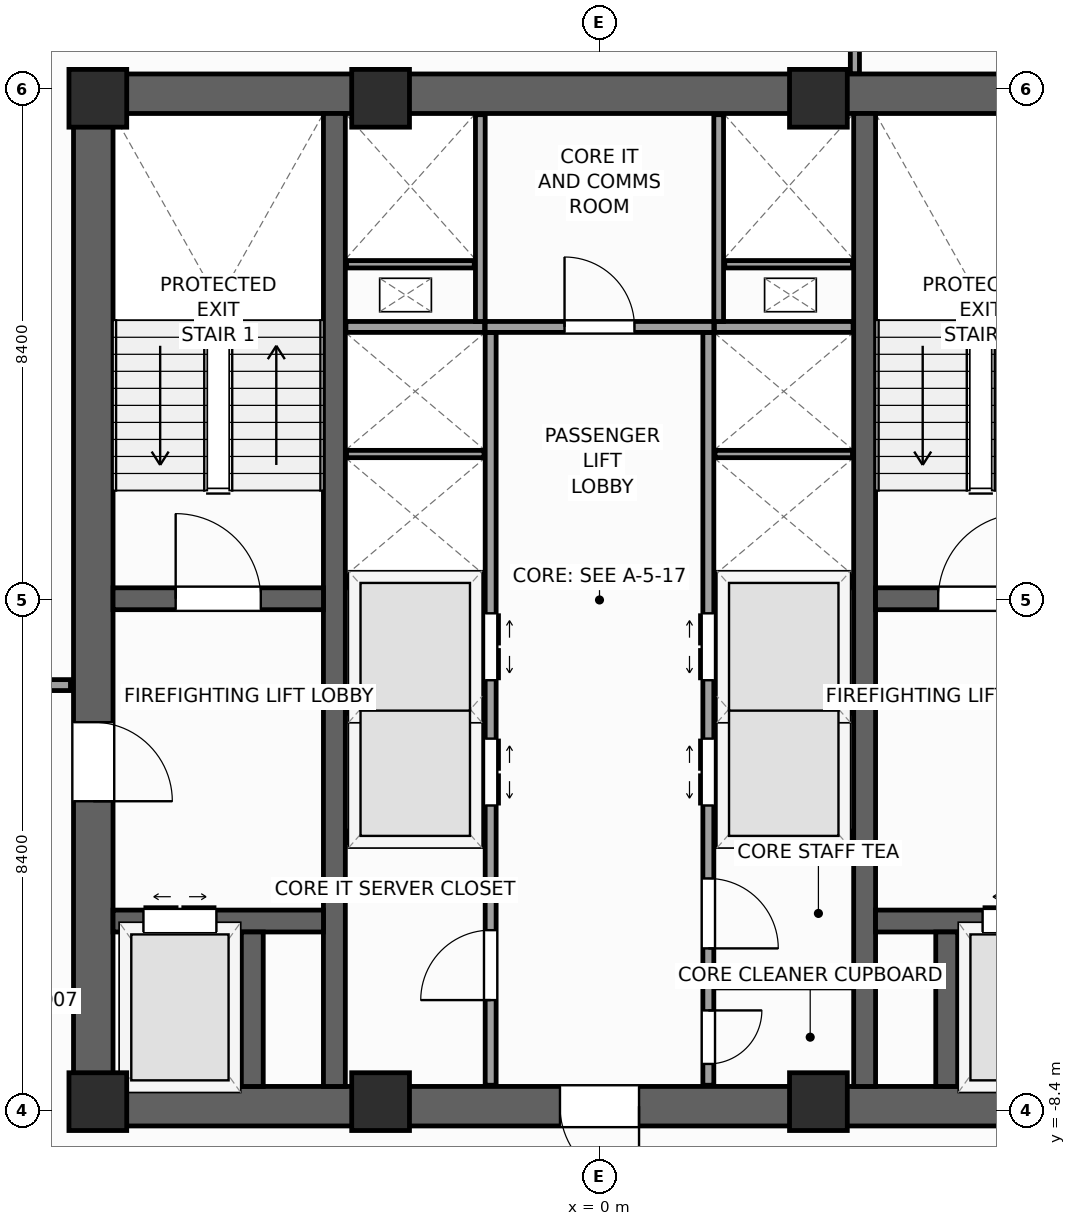
"""IFC4 building model, lengths in metres.
Left out: names, types, materials, properties, quantities, classifications, styles, units other than length and angle.
Written with IfcOpenShell. Run it as: python <this file> out.ifc"""

import sys

from ifc_helpers import new_model, si_unit, direction, frame, frame_2d, origin, origin_2d, place, context, subcontext, project, spatial, rectangle, extrude, source, transform, mapped, element, fill, save


model = new_model("IFC4")
c1 = context("Model", 3, precision=1e-05, world=origin(), true_north=direction((0.0, 1.0)))
c2 = subcontext(c1, "Body", "Model", "MODEL_VIEW")
j1 = project(units=[si_unit("LENGTHUNIT", "METRE"), si_unit("PLANEANGLEUNIT", "RADIAN")], contexts=[c1])
p1 = place(None, origin())
s1 = spatial("IfcSite", under=j1, at=p1, CompositionType="ELEMENT")
p2 = place(p1, origin())
s2 = spatial("IfcBuilding", under=s1, at=p2, CompositionType="ELEMENT")
p3 = place(p2, frame((0.0, 0.0, 176.4)))
s3 = spatial("IfcBuildingStorey", under=s2, at=p3, CompositionType="ELEMENT", Elevation=176.4)
p4 = place(p3, frame((-8.65, -8.325, 0.0), z_axis=(0.0, 0.0, 1.0), x_axis=(1.0, 0.0, 0.0)))
e1 = element("IfcWall", 1, at=p4, inside=s3, PredefinedType="SHEAR", context=c2, shape_type="SweptSolid", body=[
    extrude(rectangle(XDim=17.3, YDim=0.65, at=frame_2d((8.65, 0.0))), origin(), (0.0, 0.0, 1.0), 4.0),
])
p5 = place(p4, frame((8.0, 0.0, 0.0)))
e2 = element("IfcOpeningElement", 2, at=p5, cuts=e1, PredefinedType="OPENING", context=c2, shape_type="SweptSolid", body=[
    extrude(rectangle(XDim=1.3, YDim=2.2, at=frame_2d((0.65, 1.1))), frame((0.0, 0.335, 0.0), z_axis=(0.0, -1.0, 0.0), x_axis=(1.0, 0.0, 0.0)), (0.0, 0.0, 1.0), 0.67),
])
p6 = place(p3, frame((-8.65, 8.325, 0.0), z_axis=(0.0, 0.0, 1.0), x_axis=(1.0, 0.0, 0.0)))
e3 = element("IfcWall", 3, at=p6, inside=s3, PredefinedType="SHEAR", context=c2, shape_type="SweptSolid", body=[
    extrude(rectangle(XDim=17.3, YDim=0.65, at=frame_2d((8.65, 0.0))), origin(), (0.0, 0.0, 1.0), 4.0),
])
p7 = place(p3, frame((-8.325, -8.0, 0.0), z_axis=(0.0, 0.0, 1.0), x_axis=(0.0, 1.0, 0.0)))
e4 = element("IfcWall", 4, at=p7, inside=s3, PredefinedType="SHEAR", context=c2, shape_type="SweptSolid", body=[
    extrude(rectangle(XDim=16.0, YDim=0.65, at=frame_2d((8.0, 0.0))), origin(), (0.0, 0.0, 1.0), 4.0),
])
p8 = place(p7, frame((4.69, 0.0, 0.0)))
e5 = element("IfcOpeningElement", 5, at=p8, cuts=e4, PredefinedType="OPENING", context=c2, shape_type="SweptSolid", body=[
    extrude(rectangle(XDim=1.3, YDim=2.2, at=frame_2d((0.65, 1.1))), frame((0.0, 0.335, 0.0), z_axis=(0.0, -1.0, 0.0), x_axis=(1.0, 0.0, 0.0)), (0.0, 0.0, 1.0), 0.67),
])
for number, where, z_axis, x_axis in (
    (6, (-4.36, -8.0, 0.0), (0.0, 0.0, 1.0), (0.0, 1.0, 0.0)),
    (7, (4.36, -8.0, 0.0), (0.0, 0.0, 1.0), (0.0, 1.0, 0.0)),
):
    element("IfcWall", number, at=place(p3, frame(where, z_axis=z_axis, x_axis=x_axis)), inside=s3, PredefinedType="SHEAR", context=c2, shape_type="SweptSolid", body=[
        extrude(rectangle(XDim=16.0, YDim=0.36, at=frame_2d((8.0, 0.0))), origin(), (0.0, 0.0, 1.0), 4.0),
    ])
p9 = place(p3, frame((-8.0, 0.02, 0.0), z_axis=(0.0, 0.0, 1.0), x_axis=(1.0, 0.0, 0.0)))
e8 = element("IfcWall", 8, at=p9, inside=s3, PredefinedType="SHEAR", context=c2, shape_type="SweptSolid", body=[
    extrude(rectangle(XDim=3.46, YDim=0.36, at=frame_2d((1.73, 0.0))), origin(), (0.0, 0.0, 1.0), 4.0),
])
p10 = place(p9, frame((1.03, 0.0, 0.0)))
e9 = element("IfcOpeningElement", 9, at=p10, cuts=e8, PredefinedType="OPENING", context=c2, shape_type="SweptSolid", body=[
    extrude(rectangle(XDim=1.4, YDim=2.2, at=frame_2d((0.7, 1.1))), frame((0.0, 0.19, 0.0), z_axis=(0.0, -1.0, 0.0), x_axis=(1.0, 0.0, 0.0)), (0.0, 0.0, 1.0), 0.38),
])
p11 = place(p3, frame((4.54, 0.02, 0.0), z_axis=(0.0, 0.0, 1.0), x_axis=(1.0, 0.0, 0.0)))
e10 = element("IfcWall", 10, at=p11, inside=s3, PredefinedType="SHEAR", context=c2, shape_type="SweptSolid", body=[
    extrude(rectangle(XDim=3.46, YDim=0.36, at=frame_2d((1.73, 0.0))), origin(), (0.0, 0.0, 1.0), 4.0),
])
p12 = place(p11, frame((1.03, 0.0, 0.0)))
e11 = element("IfcOpeningElement", 11, at=p12, cuts=e10, PredefinedType="OPENING", context=c2, shape_type="SweptSolid", body=[
    extrude(rectangle(XDim=1.4, YDim=2.2, at=frame_2d((0.7, 1.1))), frame((0.0, 0.19, 0.0), z_axis=(0.0, -1.0, 0.0), x_axis=(1.0, 0.0, 0.0)), (0.0, 0.0, 1.0), 0.38),
])
p13 = place(p3, frame((-8.0, -5.28, 0.0), z_axis=(0.0, 0.0, 1.0), x_axis=(1.0, 0.0, 0.0)))
e12 = element("IfcWall", 12, at=p13, inside=s3, PredefinedType="SHEAR", context=c2, shape_type="SweptSolid", body=[
    extrude(rectangle(XDim=3.46, YDim=0.36, at=frame_2d((1.73, 0.0))), origin(), (0.0, 0.0, 1.0), 4.0),
])
p14 = place(p13, frame((0.5, 0.0, 0.0)))
e13 = element("IfcOpeningElement", 13, at=p14, cuts=e12, PredefinedType="OPENING", context=c2, shape_type="SweptSolid", body=[
    extrude(rectangle(XDim=1.2, YDim=2.25, at=frame_2d((0.6, 1.125))), frame((0.0, 0.19, 0.0), z_axis=(0.0, -1.0, 0.0), x_axis=(1.0, 0.0, 0.0)), (0.0, 0.0, 1.0), 0.38),
])
p15 = place(p3, frame((4.54, -5.28, 0.0), z_axis=(0.0, 0.0, 1.0), x_axis=(1.0, 0.0, 0.0)))
e14 = element("IfcWall", 14, at=p15, inside=s3, PredefinedType="SHEAR", context=c2, shape_type="SweptSolid", body=[
    extrude(rectangle(XDim=3.46, YDim=0.36, at=frame_2d((1.73, 0.0))), origin(), (0.0, 0.0, 1.0), 4.0),
])
p16 = place(p15, frame((1.76, 0.0, 0.0)))
e15 = element("IfcOpeningElement", 15, at=p16, cuts=e14, PredefinedType="OPENING", context=c2, shape_type="SweptSolid", body=[
    extrude(rectangle(XDim=1.2, YDim=2.25, at=frame_2d((0.6, 1.125))), frame((0.0, 0.19, 0.0), z_axis=(0.0, -1.0, 0.0), x_axis=(1.0, 0.0, 0.0)), (0.0, 0.0, 1.0), 0.38),
])
for number, where, z_axis, x_axis in (
    (16, (-5.71, -8.0, 0.0), (0.0, 0.0, 1.0), (0.0, 1.0, 0.0)),
    (17, (5.71, -8.0, 0.0), (0.0, 0.0, 1.0), (0.0, 1.0, 0.0)),
):
    element("IfcWall", number, at=place(p3, frame(where, z_axis=z_axis, x_axis=x_axis)), inside=s3, PredefinedType="SHEAR", context=c2, shape_type="SweptSolid", body=[
        extrude(rectangle(XDim=2.54, YDim=0.36, at=frame_2d((1.27, 0.0))), origin(), (0.0, 0.0, 1.0), 4.0),
    ])
m1 = source(origin(), c2, "Body", "SweptSolid", [
    extrude(rectangle(XDim=0.95, YDim=0.95, at=origin_2d()), origin(), (0.0, 0.0, 1.0), 4.0),
])
for number, where, z_axis, x_axis in (
    (18, (-8.25, -8.25, 0.0), (0.0, 0.0, 1.0), (1.0, 0.0, 0.0)),
    (19, (-8.25, 8.25, 0.0), (0.0, 0.0, 1.0), (1.0, 0.0, 0.0)),
    (20, (-3.6, -8.25, 0.0), (0.0, 0.0, 1.0), (1.0, 0.0, 0.0)),
    (21, (3.6, -8.25, 0.0), (0.0, 0.0, 1.0), (1.0, 0.0, 0.0)),
    (22, (-3.6, 8.25, 0.0), (0.0, 0.0, 1.0), (1.0, 0.0, 0.0)),
    (23, (3.6, 8.25, 0.0), (0.0, 0.0, 1.0), (1.0, 0.0, 0.0)),
):
    element("IfcColumn", number, at=place(p3, frame(where, z_axis=z_axis, x_axis=x_axis)), inside=s3, PredefinedType="PILASTER", context=c2, shape_type="MappedRepresentation", body=[
        mapped(m1, transform((0.0, 0.0, 0.0), scale=1.0)),
    ])
p17 = place(p3, frame((-1.79, -7.98, 0.0), z_axis=(0.0, 0.0, 1.0), x_axis=(0.0, 1.0, 0.0)))
e24 = element("IfcWall", 24, at=p17, inside=s3, PredefinedType="PARTITIONING", context=c2, shape_type="SweptSolid", body=[
    extrude(rectangle(XDim=12.38, YDim=0.18, at=frame_2d((6.19, 0.0))), origin(), (0.0, 0.0, 1.0), 3.74),
])
p18 = place(p17, frame((4.6, 0.0, 0.0)))
e25 = element("IfcOpeningElement", 25, at=p18, cuts=e24, PredefinedType="OPENING", context=c2, shape_type="SweptSolid", body=[
    extrude(rectangle(XDim=1.1, YDim=2.2, at=frame_2d((0.55, 1.1))), frame((0.0, 0.1, 0.0), z_axis=(0.0, -1.0, 0.0), x_axis=(1.0, 0.0, 0.0)), (0.0, 0.0, 1.0), 0.2),
])
p19 = place(p17, frame((6.66, 0.0, 0.0)))
e26 = element("IfcOpeningElement", 26, at=p19, cuts=e24, PredefinedType="OPENING", context=c2, shape_type="SweptSolid", body=[
    extrude(rectangle(XDim=1.1, YDim=2.2, at=frame_2d((0.55, 1.1))), frame((0.0, 0.1, 0.0), z_axis=(0.0, -1.0, 0.0), x_axis=(1.0, 0.0, 0.0)), (0.0, 0.0, 1.0), 0.2),
])
p20 = place(p17, frame((1.4, 0.0, 0.0)))
e27 = element("IfcOpeningElement", 27, at=p20, cuts=e24, PredefinedType="OPENING", context=c2, shape_type="SweptSolid", body=[
    extrude(rectangle(XDim=1.15, YDim=2.25, at=frame_2d((0.575, 1.125))), frame((0.0, 0.1, 0.0), z_axis=(0.0, -1.0, 0.0), x_axis=(1.0, 0.0, 0.0)), (0.0, 0.0, 1.0), 0.2),
])
p21 = place(p3, frame((1.79, -7.98, 0.0), z_axis=(0.0, 0.0, 1.0), x_axis=(0.0, 1.0, 0.0)))
e28 = element("IfcWall", 28, at=p21, inside=s3, PredefinedType="PARTITIONING", context=c2, shape_type="SweptSolid", body=[
    extrude(rectangle(XDim=12.38, YDim=0.18, at=frame_2d((6.19, 0.0))), origin(), (0.0, 0.0, 1.0), 3.74),
])
p22 = place(p21, frame((4.6, 0.0, 0.0)))
e29 = element("IfcOpeningElement", 29, at=p22, cuts=e28, PredefinedType="OPENING", context=c2, shape_type="SweptSolid", body=[
    extrude(rectangle(XDim=1.1, YDim=2.2, at=frame_2d((0.55, 1.1))), frame((0.0, 0.1, 0.0), z_axis=(0.0, -1.0, 0.0), x_axis=(1.0, 0.0, 0.0)), (0.0, 0.0, 1.0), 0.2),
])
p23 = place(p21, frame((6.66, 0.0, 0.0)))
e30 = element("IfcOpeningElement", 30, at=p23, cuts=e28, PredefinedType="OPENING", context=c2, shape_type="SweptSolid", body=[
    extrude(rectangle(XDim=1.1, YDim=2.2, at=frame_2d((0.55, 1.1))), frame((0.0, 0.1, 0.0), z_axis=(0.0, -1.0, 0.0), x_axis=(1.0, 0.0, 0.0)), (0.0, 0.0, 1.0), 0.2),
])
p24 = place(p21, frame((0.35, 0.0, 0.0)))
e31 = element("IfcOpeningElement", 31, at=p24, cuts=e28, PredefinedType="OPENING", context=c2, shape_type="SweptSolid", body=[
    extrude(rectangle(XDim=0.88, YDim=2.1, at=frame_2d((0.44, 1.05))), frame((0.0, 0.1, 0.0), z_axis=(0.0, -1.0, 0.0), x_axis=(1.0, 0.0, 0.0)), (0.0, 0.0, 1.0), 0.2),
])
p25 = place(p21, frame((2.25, 0.0, 0.0)))
e32 = element("IfcOpeningElement", 32, at=p25, cuts=e28, PredefinedType="OPENING", context=c2, shape_type="SweptSolid", body=[
    extrude(rectangle(XDim=1.15, YDim=2.25, at=frame_2d((0.575, 1.125))), frame((0.0, 0.1, 0.0), z_axis=(0.0, -1.0, 0.0), x_axis=(1.0, 0.0, 0.0)), (0.0, 0.0, 1.0), 0.2),
])
p26 = place(p3, frame((-1.88, 4.49, 0.0), z_axis=(0.0, 0.0, 1.0), x_axis=(1.0, 0.0, 0.0)))
e33 = element("IfcWall", 33, at=p26, inside=s3, PredefinedType="PARTITIONING", context=c2, shape_type="SweptSolid", body=[
    extrude(rectangle(XDim=3.76, YDim=0.18, at=frame_2d((1.88, 0.0))), origin(), (0.0, 0.0, 1.0), 3.74),
])
p27 = place(p26, frame((1.305, 0.0, 0.0)))
e34 = element("IfcOpeningElement", 34, at=p27, cuts=e33, PredefinedType="OPENING", context=c2, shape_type="SweptSolid", body=[
    extrude(rectangle(XDim=1.15, YDim=2.25, at=frame_2d((0.575, 1.125))), frame((0.0, 0.1, 0.0), z_axis=(0.0, -1.0, 0.0), x_axis=(1.0, 0.0, 0.0)), (0.0, 0.0, 1.0), 0.2),
])
for number, where, z_axis, x_axis in (
    (35, (-4.17, -3.9, 0.0), (0.0, 0.0, 1.0), (1.0, 0.0, 0.0)),
    (36, (1.89, -3.9, 0.0), (0.0, 0.0, 1.0), (1.0, 0.0, 0.0)),
    (37, (-4.17, 0.3, 0.0), (0.0, 0.0, 1.0), (1.0, 0.0, 0.0)),
    (38, (1.89, 0.3, 0.0), (0.0, 0.0, 1.0), (1.0, 0.0, 0.0)),
    (39, (-4.17, 4.49, 0.0), (0.0, 0.0, 1.0), (1.0, 0.0, 0.0)),
    (40, (1.89, 4.49, 0.0), (0.0, 0.0, 1.0), (1.0, 0.0, 0.0)),
):
    element("IfcWall", number, at=place(p3, frame(where, z_axis=z_axis, x_axis=x_axis)), inside=s3, PredefinedType="PARTITIONING", context=c2, shape_type="SweptSolid", body=[
        extrude(rectangle(XDim=2.28, YDim=0.18, at=frame_2d((1.14, 0.0))), origin(), (0.0, 0.0, 1.0), 3.74),
    ])
for number, where, z_axis, x_axis in (
    (41, (-4.16, -1.8, 0.0), (0.0, 0.0, 1.0), (1.0, 0.0, 0.0)),
    (42, (1.9, -1.8, 0.0), (0.0, 0.0, 1.0), (1.0, 0.0, 0.0)),
    (43, (-4.16, 2.4, 0.0), (0.0, 0.0, 1.0), (1.0, 0.0, 0.0)),
    (44, (1.9, 2.4, 0.0), (0.0, 0.0, 1.0), (1.0, 0.0, 0.0)),
):
    element("IfcWall", number, at=place(p3, frame(where, z_axis=z_axis, x_axis=x_axis)), inside=s3, PredefinedType="PARTITIONING", context=c2, shape_type="SweptSolid", body=[
        extrude(rectangle(XDim=2.26, YDim=0.12, at=frame_2d((1.13, 0.0))), origin(), (0.0, 0.0, 1.0), 3.74),
    ])
p28 = place(p3, frame((1.89, -6.3, 0.0), z_axis=(0.0, 0.0, 1.0), x_axis=(1.0, 0.0, 0.0)))
e45 = element("IfcWall", 45, at=p28, inside=s3, PredefinedType="PARTITIONING", context=c2, shape_type="SweptSolid", body=[
    extrude(rectangle(XDim=2.28, YDim=0.16, at=frame_2d((1.14, 0.0))), origin(), (0.0, 0.0, 1.0), 3.74),
])
for number, where, z_axis, x_axis in (
    (46, (-1.96, 4.58, 0.0), (0.0, 0.0, 1.0), (0.0, 1.0, 0.0)),
    (47, (1.96, 4.58, 0.0), (0.0, 0.0, 1.0), (0.0, 1.0, 0.0)),
):
    element("IfcWall", number, at=place(p3, frame(where, z_axis=z_axis, x_axis=x_axis)), inside=s3, PredefinedType="PARTITIONING", context=c2, shape_type="SweptSolid", body=[
        extrude(rectangle(XDim=3.4, YDim=0.16, at=frame_2d((1.7, 0.0))), origin(), (0.0, 0.0, 1.0), 3.74),
    ])
for number, where, z_axis, x_axis in (
    (48, (-4.16, 5.52, 0.0), (0.0, 0.0, 1.0), (1.0, 0.0, 0.0)),
    (49, (2.06, 5.52, 0.0), (0.0, 0.0, 1.0), (1.0, 0.0, 0.0)),
):
    element("IfcWall", number, at=place(p3, frame(where, z_axis=z_axis, x_axis=x_axis)), inside=s3, PredefinedType="PARTITIONING", context=c2, shape_type="SweptSolid", body=[
        extrude(rectangle(XDim=2.1, YDim=0.12, at=frame_2d((1.05, 0.0))), origin(), (0.0, 0.0, 1.0), 3.74),
    ])
p29 = place(p3, frame((-10.45, -1.4, 0.0), z_axis=(0.0, 0.0, 1.0), x_axis=(1.0, 0.0, 0.0)))
e50 = element("IfcWall", 50, at=p29, inside=s3, PredefinedType="PARTITIONING", context=c2, shape_type="SweptSolid", body=[
    extrude(rectangle(XDim=1.75, YDim=0.18, at=frame_2d((0.875, 0.0))), origin(), (0.0, 0.0, 1.0), 3.74),
])
p30 = place(p29, frame((0.325, 0.0, 0.0)))
e51 = element("IfcOpeningElement", 51, at=p30, cuts=e50, PredefinedType="OPENING", context=c2, shape_type="SweptSolid", body=[
    extrude(rectangle(XDim=1.1, YDim=2.2, at=frame_2d((0.55, 1.1))), frame((0.0, 0.1, 0.0), z_axis=(0.0, -1.0, 0.0), x_axis=(1.0, 0.0, 0.0)), (0.0, 0.0, 1.0), 0.2),
])
p31 = place(p3, frame((4.2, 8.655, 0.0), z_axis=(0.0, 0.0, 1.0), x_axis=(0.0, 1.0, 0.0)))
e52 = element("IfcWall", 52, at=p31, inside=s3, PredefinedType="PARTITIONING", context=c2, shape_type="SweptSolid", body=[
    extrude(rectangle(XDim=21.286, YDim=0.15, at=frame_2d((10.643, 0.0))), origin(), (0.0, 0.0, 1.0), 3.74),
])
m2 = source(origin(), c2, "Body", "SweptSolid", [
    extrude(rectangle(XDim=1.4, YDim=2.2, at=frame_2d((0.7, 1.1))), frame((0.0, 0.025, 0.0), z_axis=(0.0, -1.0, 0.0), x_axis=(1.0, 0.0, 0.0)), (0.0, 0.0, 1.0), 0.05),
])
p32 = place(p10, origin())
e53 = element("IfcDoor", 53, at=p32, inside=s3, OperationType="SINGLE_SWING_LEFT", PredefinedType="DOOR", context=c2, shape_type="MappedRepresentation", body=[
    mapped(m2, transform((0.0, 0.0, 0.0), scale=1.0)),
])
fill(e9, e53)
p33 = place(p12, origin())
e54 = element("IfcDoor", 54, at=p33, inside=s3, OperationType="SINGLE_SWING_RIGHT", PredefinedType="DOOR", context=c2, shape_type="MappedRepresentation", body=[
    mapped(m2, transform((0.0, 0.0, 0.0), scale=1.0)),
])
fill(e11, e54)
m3 = source(origin(), c2, "Body", "SweptSolid", [
    extrude(rectangle(XDim=1.3, YDim=2.2, at=frame_2d((0.65, 1.1))), frame((0.0, 0.025, 0.0), z_axis=(0.0, -1.0, 0.0), x_axis=(1.0, 0.0, 0.0)), (0.0, 0.0, 1.0), 0.05),
])
p34 = place(p8, frame((1.3, 0.0, 0.0), z_axis=(0.0, 0.0, 1.0), x_axis=(-1.0, 0.0, 0.0)))
e55 = element("IfcDoor", 55, at=p34, inside=s3, OperationType="SINGLE_SWING_LEFT", PredefinedType="DOOR", context=c2, shape_type="MappedRepresentation", body=[
    mapped(m3, transform((0.0, 0.0, 0.0), scale=1.0)),
])
fill(e5, e55)
p35 = place(p5, frame((1.3, 0.0, 0.0), z_axis=(0.0, 0.0, 1.0), x_axis=(-1.0, 0.0, 0.0)))
e56 = element("IfcDoor", 56, at=p35, inside=s3, OperationType="SINGLE_SWING_RIGHT", PredefinedType="DOOR", context=c2, shape_type="MappedRepresentation", body=[
    mapped(m3, transform((0.0, 0.0, 0.0), scale=1.0)),
])
fill(e2, e56)
m4 = source(origin(), c2, "Body", "SweptSolid", [
    extrude(rectangle(XDim=1.2, YDim=2.25, at=frame_2d((0.6, 1.125))), frame((0.0, 0.025, 0.0), z_axis=(0.0, -1.0, 0.0), x_axis=(1.0, 0.0, 0.0)), (0.0, 0.0, 1.0), 0.05),
])
p36 = place(p14, origin())
e57 = element("IfcDoor", 57, at=p36, inside=s3, OperationType="DOUBLE_DOOR_SLIDING", PredefinedType="DOOR", context=c2, shape_type="MappedRepresentation", body=[
    mapped(m4, transform((0.0, 0.0, 0.0), scale=1.0)),
])
fill(e13, e57)
p37 = place(p16, origin())
e58 = element("IfcDoor", 58, at=p37, inside=s3, OperationType="DOUBLE_DOOR_SLIDING", PredefinedType="DOOR", context=c2, shape_type="MappedRepresentation", body=[
    mapped(m4, transform((0.0, 0.0, 0.0), scale=1.0)),
])
fill(e15, e58)
m5 = source(origin(), c2, "Body", "SweptSolid", [
    extrude(rectangle(XDim=1.1, YDim=2.2, at=frame_2d((0.55, 1.1))), frame((0.0, 0.025, 0.0), z_axis=(0.0, -1.0, 0.0), x_axis=(1.0, 0.0, 0.0)), (0.0, 0.0, 1.0), 0.05),
])
p38 = place(p18, frame((1.1, 0.0, 0.0), z_axis=(0.0, 0.0, 1.0), x_axis=(-1.0, 0.0, 0.0)))
e59 = element("IfcDoor", 59, at=p38, inside=s3, OperationType="DOUBLE_DOOR_SLIDING", PredefinedType="DOOR", context=c2, shape_type="MappedRepresentation", body=[
    mapped(m5, transform((0.0, 0.0, 0.0), scale=1.0)),
])
fill(e25, e59)
p39 = place(p19, frame((1.1, 0.0, 0.0), z_axis=(0.0, 0.0, 1.0), x_axis=(-1.0, 0.0, 0.0)))
e60 = element("IfcDoor", 60, at=p39, inside=s3, OperationType="DOUBLE_DOOR_SLIDING", PredefinedType="DOOR", context=c2, shape_type="MappedRepresentation", body=[
    mapped(m5, transform((0.0, 0.0, 0.0), scale=1.0)),
])
fill(e26, e60)
p40 = place(p22, origin())
e61 = element("IfcDoor", 61, at=p40, inside=s3, OperationType="DOUBLE_DOOR_SLIDING", PredefinedType="DOOR", context=c2, shape_type="MappedRepresentation", body=[
    mapped(m5, transform((0.0, 0.0, 0.0), scale=1.0)),
])
fill(e29, e61)
p41 = place(p23, origin())
e62 = element("IfcDoor", 62, at=p41, inside=s3, OperationType="DOUBLE_DOOR_SLIDING", PredefinedType="DOOR", context=c2, shape_type="MappedRepresentation", body=[
    mapped(m5, transform((0.0, 0.0, 0.0), scale=1.0)),
])
fill(e30, e62)
m6 = source(origin(), c2, "Body", "SweptSolid", [
    extrude(rectangle(XDim=1.15, YDim=2.25, at=frame_2d((0.575, 1.125))), frame((0.0, 0.025, 0.0), z_axis=(0.0, -1.0, 0.0), x_axis=(1.0, 0.0, 0.0)), (0.0, 0.0, 1.0), 0.05),
])
p42 = place(p20, origin())
e63 = element("IfcDoor", 63, at=p42, inside=s3, OperationType="SINGLE_SWING_LEFT", PredefinedType="DOOR", context=c2, shape_type="MappedRepresentation", body=[
    mapped(m6, transform((0.0, 0.0, 0.0), scale=1.0)),
])
fill(e27, e63)
m7 = source(origin(), c2, "Body", "SweptSolid", [
    extrude(rectangle(XDim=0.88, YDim=2.1, at=frame_2d((0.44, 1.05))), frame((0.0, 0.025, 0.0), z_axis=(0.0, -1.0, 0.0), x_axis=(1.0, 0.0, 0.0)), (0.0, 0.0, 1.0), 0.05),
])
p43 = place(p24, frame((0.88, 0.0, 0.0), z_axis=(0.0, 0.0, 1.0), x_axis=(-1.0, 0.0, 0.0)))
e64 = element("IfcDoor", 64, at=p43, inside=s3, OperationType="SINGLE_SWING_RIGHT", PredefinedType="DOOR", context=c2, shape_type="MappedRepresentation", body=[
    mapped(m7, transform((0.0, 0.0, 0.0), scale=1.0)),
])
fill(e31, e64)
p44 = place(p25, frame((1.15, 0.0, 0.0), z_axis=(0.0, 0.0, 1.0), x_axis=(-1.0, 0.0, 0.0)))
e65 = element("IfcDoor", 65, at=p44, inside=s3, OperationType="SINGLE_SWING_LEFT", PredefinedType="DOOR", context=c2, shape_type="MappedRepresentation", body=[
    mapped(m6, transform((0.0, 0.0, 0.0), scale=1.0)),
])
fill(e32, e65)
p45 = place(p27, origin())
e66 = element("IfcDoor", 66, at=p45, inside=s3, OperationType="SINGLE_SWING_LEFT", PredefinedType="DOOR", context=c2, shape_type="MappedRepresentation", body=[
    mapped(m6, transform((0.0, 0.0, 0.0), scale=1.0)),
])
fill(e34, e66)
save(model, sys.argv[1])
